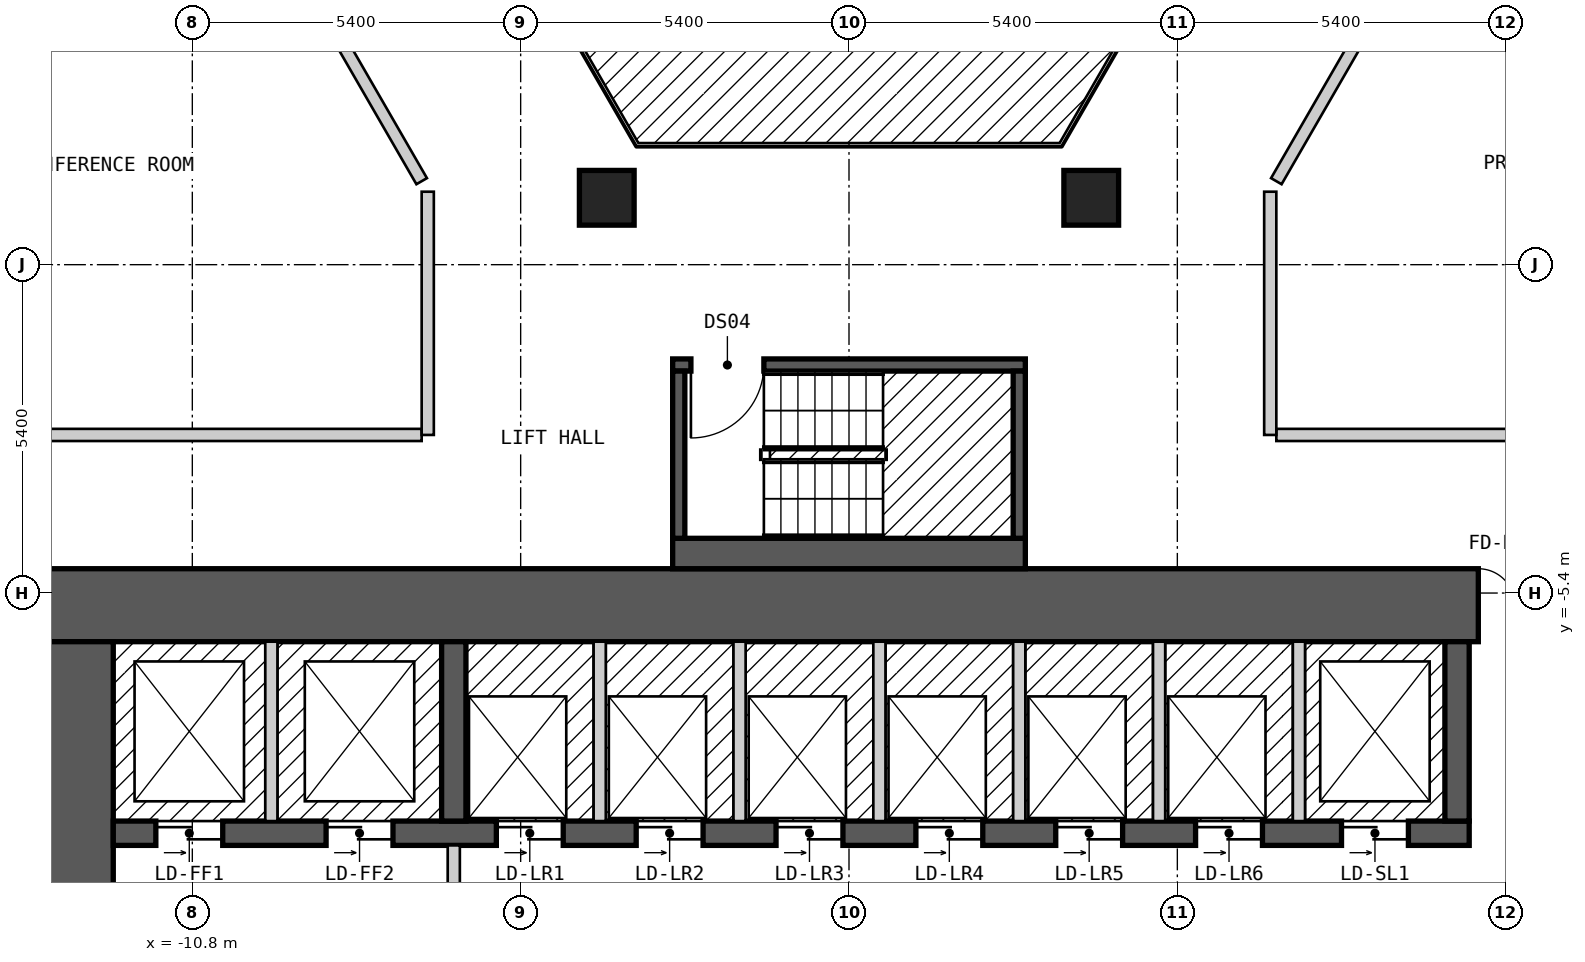
"""IFC4 building model, lengths in metres.
Left out: names, types, materials, properties, quantities, classifications, styles, units other than length and angle.
Written with IfcOpenShell. Run it as: python <this file> out.ifc"""

import sys

from ifc_helpers import new_model, si_unit, direction, frame, frame_2d, origin, origin_2d, place, context, subcontext, project, spatial, rectangle, extrude, element, fill, save


model = new_model("IFC4")
c1 = context("Model", 3, precision=1e-05, world=origin(), true_north=direction((0.0, 1.0)))
c2 = subcontext(c1, "Body", "Model", "MODEL_VIEW")
j1 = project(units=[si_unit("LENGTHUNIT", "METRE"), si_unit("PLANEANGLEUNIT", "RADIAN")], contexts=[c1])
p1 = place(None, origin())
s1 = spatial("IfcSite", under=j1, at=p1, CompositionType="ELEMENT")
p2 = place(p1, origin())
s2 = spatial("IfcBuilding", under=s1, at=p2, CompositionType="ELEMENT")
p3 = place(p2, frame((0.0, 0.0, 44.4)))
s3 = spatial("IfcBuildingStorey", under=s2, at=p3, CompositionType="ELEMENT", Elevation=44.4)
for number, where, z_axis, x_axis in (
    (1, (3.984, 1.1, 0.0), (0.0, 0.0, 1.0), (1.0, 0.0, 0.0)),
    (2, (-3.984, 1.1, 0.0), (0.0, 0.0, 1.0), (1.0, 0.0, 0.0)),
):
    element("IfcColumn", number, at=place(p3, frame(where, z_axis=z_axis, x_axis=x_axis)), inside=s3, PredefinedType="COLUMN", context=c2, shape_type="SweptSolid", body=[
        extrude(rectangle(XDim=0.9, YDim=0.9, at=origin_2d()), origin(), (0.0, 0.0, 1.0), 3.0),
    ])
p4 = place(p3, frame((-13.3, -5.6, 0.0), z_axis=(0.0, 0.0, 1.0), x_axis=(1.0, 0.0, 0.0)))
e3 = element("IfcWall", 3, at=p4, inside=s3, PredefinedType="SHEAR", context=c2, shape_type="SweptSolid", body=[
    extrude(rectangle(XDim=26.6, YDim=1.2, at=frame_2d((13.3, 0.0))), origin(), (0.0, 0.0, 1.0), 2.7),
])
p5 = place(p4, frame((23.65, 0.0, 0.0)))
e4 = element("IfcOpeningElement", 4, at=p5, cuts=e3, PredefinedType="OPENING", context=c2, shape_type="SweptSolid", body=[
    extrude(rectangle(XDim=1.2, YDim=2.1, at=frame_2d((0.6, 1.05))), frame((0.0, 0.61, 0.0), z_axis=(0.0, -1.0, 0.0), x_axis=(1.0, 0.0, 0.0)), (0.0, 0.0, 1.0), 1.22),
])
p6 = place(p3, frame((-12.7, -17.8, 0.0), z_axis=(0.0, 0.0, 1.0), x_axis=(0.0, 1.0, 0.0)))
e5 = element("IfcWall", 5, at=p6, inside=s3, PredefinedType="SHEAR", context=c2, shape_type="SweptSolid", body=[
    extrude(rectangle(XDim=11.6, YDim=1.2, at=frame_2d((5.8, 0.0))), origin(), (0.0, 0.0, 1.0), 2.7),
])
p7 = place(p6, frame((3.6, 0.0, 0.0)))
e6 = element("IfcOpeningElement", 6, at=p7, cuts=e5, PredefinedType="OPENING", context=c2, shape_type="SweptSolid", body=[
    extrude(rectangle(XDim=1.2, YDim=2.1, at=frame_2d((0.6, 1.05))), frame((0.0, 0.61, 0.0), z_axis=(0.0, -1.0, 0.0), x_axis=(1.0, 0.0, 0.0)), (0.0, 0.0, 1.0), 1.22),
])
p8 = place(p3, frame((-12.1, -9.35, 0.0), z_axis=(0.0, 0.0, 1.0), x_axis=(1.0, 0.0, 0.0)))
e7 = element("IfcWall", 7, at=p8, inside=s3, PredefinedType="SHEAR", context=c2, shape_type="SweptSolid", body=[
    extrude(rectangle(XDim=22.3, YDim=0.4, at=frame_2d((11.15, 0.0))), origin(), (0.0, 0.0, 1.0), 2.7),
])
p9 = place(p8, frame((0.7, 0.0, 0.0)))
e8 = element("IfcOpeningElement", 8, at=p9, cuts=e7, PredefinedType="OPENING", context=c2, shape_type="SweptSolid", body=[
    extrude(rectangle(XDim=1.1, YDim=2.1, at=frame_2d((0.55, 1.05))), frame((0.0, 0.21, 0.0), z_axis=(0.0, -1.0, 0.0), x_axis=(1.0, 0.0, 0.0)), (0.0, 0.0, 1.0), 0.42),
])
p10 = place(p8, frame((3.5, 0.0, 0.0)))
e9 = element("IfcOpeningElement", 9, at=p10, cuts=e7, PredefinedType="OPENING", context=c2, shape_type="SweptSolid", body=[
    extrude(rectangle(XDim=1.1, YDim=2.1, at=frame_2d((0.55, 1.05))), frame((0.0, 0.21, 0.0), z_axis=(0.0, -1.0, 0.0), x_axis=(1.0, 0.0, 0.0)), (0.0, 0.0, 1.0), 0.42),
])
p11 = place(p8, frame((6.3, 0.0, 0.0)))
e10 = element("IfcOpeningElement", 10, at=p11, cuts=e7, PredefinedType="OPENING", context=c2, shape_type="SweptSolid", body=[
    extrude(rectangle(XDim=1.1, YDim=2.1, at=frame_2d((0.55, 1.05))), frame((0.0, 0.21, 0.0), z_axis=(0.0, -1.0, 0.0), x_axis=(1.0, 0.0, 0.0)), (0.0, 0.0, 1.0), 0.42),
])
p12 = place(p8, frame((8.6, 0.0, 0.0)))
e11 = element("IfcOpeningElement", 11, at=p12, cuts=e7, PredefinedType="OPENING", context=c2, shape_type="SweptSolid", body=[
    extrude(rectangle(XDim=1.1, YDim=2.1, at=frame_2d((0.55, 1.05))), frame((0.0, 0.21, 0.0), z_axis=(0.0, -1.0, 0.0), x_axis=(1.0, 0.0, 0.0)), (0.0, 0.0, 1.0), 0.42),
])
p13 = place(p8, frame((10.9, 0.0, 0.0)))
e12 = element("IfcOpeningElement", 12, at=p13, cuts=e7, PredefinedType="OPENING", context=c2, shape_type="SweptSolid", body=[
    extrude(rectangle(XDim=1.1, YDim=2.1, at=frame_2d((0.55, 1.05))), frame((0.0, 0.21, 0.0), z_axis=(0.0, -1.0, 0.0), x_axis=(1.0, 0.0, 0.0)), (0.0, 0.0, 1.0), 0.42),
])
p14 = place(p8, frame((13.2, 0.0, 0.0)))
e13 = element("IfcOpeningElement", 13, at=p14, cuts=e7, PredefinedType="OPENING", context=c2, shape_type="SweptSolid", body=[
    extrude(rectangle(XDim=1.1, YDim=2.1, at=frame_2d((0.55, 1.05))), frame((0.0, 0.21, 0.0), z_axis=(0.0, -1.0, 0.0), x_axis=(1.0, 0.0, 0.0)), (0.0, 0.0, 1.0), 0.42),
])
p15 = place(p8, frame((15.5, 0.0, 0.0)))
e14 = element("IfcOpeningElement", 14, at=p15, cuts=e7, PredefinedType="OPENING", context=c2, shape_type="SweptSolid", body=[
    extrude(rectangle(XDim=1.1, YDim=2.1, at=frame_2d((0.55, 1.05))), frame((0.0, 0.21, 0.0), z_axis=(0.0, -1.0, 0.0), x_axis=(1.0, 0.0, 0.0)), (0.0, 0.0, 1.0), 0.42),
])
p16 = place(p8, frame((17.8, 0.0, 0.0)))
e15 = element("IfcOpeningElement", 15, at=p16, cuts=e7, PredefinedType="OPENING", context=c2, shape_type="SweptSolid", body=[
    extrude(rectangle(XDim=1.1, YDim=2.1, at=frame_2d((0.55, 1.05))), frame((0.0, 0.21, 0.0), z_axis=(0.0, -1.0, 0.0), x_axis=(1.0, 0.0, 0.0)), (0.0, 0.0, 1.0), 0.42),
])
p17 = place(p8, frame((20.2, 0.0, 0.0)))
e16 = element("IfcOpeningElement", 16, at=p17, cuts=e7, PredefinedType="OPENING", context=c2, shape_type="SweptSolid", body=[
    extrude(rectangle(XDim=1.1, YDim=2.1, at=frame_2d((0.55, 1.05))), frame((0.0, 0.21, 0.0), z_axis=(0.0, -1.0, 0.0), x_axis=(1.0, 0.0, 0.0)), (0.0, 0.0, 1.0), 0.42),
])
for number, where, z_axis, x_axis in (
    (17, (-6.5, -9.15, 0.0), (0.0, 0.0, 1.0), (0.0, 1.0, 0.0)),
    (18, (10.0, -9.15, 0.0), (0.0, 0.0, 1.0), (0.0, 1.0, 0.0)),
):
    element("IfcWall", number, at=place(p3, frame(where, z_axis=z_axis, x_axis=x_axis)), inside=s3, PredefinedType="SHEAR", context=c2, shape_type="SweptSolid", body=[
        extrude(rectangle(XDim=2.95, YDim=0.4, at=frame_2d((1.475, 0.0))), origin(), (0.0, 0.0, 1.0), 2.7),
    ])
p18 = place(p3, frame((-2.9, -4.75, 0.0), z_axis=(0.0, 0.0, 1.0), x_axis=(1.0, 0.0, 0.0)))
e19 = element("IfcWall", 19, at=p18, inside=s3, PredefinedType="SOLIDWALL", context=c2, shape_type="SweptSolid", body=[
    extrude(rectangle(XDim=5.8, YDim=0.5, at=frame_2d((2.9, 0.0))), origin(), (0.0, 0.0, 1.0), 2.7),
])
p19 = place(p3, frame((-2.9, -1.65, 0.0), z_axis=(0.0, 0.0, 1.0), x_axis=(1.0, 0.0, 0.0)))
e20 = element("IfcWall", 20, at=p19, inside=s3, PredefinedType="SOLIDWALL", context=c2, shape_type="SweptSolid", body=[
    extrude(rectangle(XDim=5.8, YDim=0.2, at=frame_2d((2.9, 0.0))), origin(), (0.0, 0.0, 1.0), 2.7),
])
p20 = place(p19, frame((0.3, 0.0, 0.0)))
e21 = element("IfcOpeningElement", 21, at=p20, cuts=e20, PredefinedType="OPENING", context=c2, shape_type="SweptSolid", body=[
    extrude(rectangle(XDim=1.2, YDim=2.1, at=frame_2d((0.6, 1.05))), frame((0.0, 0.11, 0.0), z_axis=(0.0, -1.0, 0.0), x_axis=(1.0, 0.0, 0.0)), (0.0, 0.0, 1.0), 0.22),
])
for number, where, z_axis, x_axis in (
    (22, (-2.8, -4.5, 0.0), (0.0, 0.0, 1.0), (0.0, 1.0, 0.0)),
    (23, (2.8, -4.5, 0.0), (0.0, 0.0, 1.0), (0.0, 1.0, 0.0)),
):
    element("IfcWall", number, at=place(p3, frame(where, z_axis=z_axis, x_axis=x_axis)), inside=s3, PredefinedType="SOLIDWALL", context=c2, shape_type="SweptSolid", body=[
        extrude(rectangle(XDim=2.75, YDim=0.2, at=frame_2d((1.375, 0.0))), origin(), (0.0, 0.0, 1.0), 2.7),
    ])
p21 = place(p3, frame((-10.796, 7.9, 0.0), z_axis=(0.0, 0.0, 1.0), x_axis=(0.499954271211, -0.866051803703, 0.0)))
e24 = element("IfcWall", 24, at=p21, inside=s3, PredefinedType="PARTITIONING", context=c2, shape_type="SweptSolid", body=[
    extrude(rectangle(XDim=7.536, YDim=0.2, at=frame_2d((3.768, 0.0))), origin(), (0.0, 0.0, 1.0), 2.7),
])
p22 = place(p3, frame((9.18, 15.7, 0.0), z_axis=(0.0, 0.0, 1.0), x_axis=(0.500003652032, -0.866023295272, 0.0)))
e25 = element("IfcWall", 25, at=p22, inside=s3, PredefinedType="PARTITIONING", context=c2, shape_type="SweptSolid", body=[
    extrude(rectangle(XDim=18.012, YDim=0.2, at=frame_2d((9.006, 0.0))), origin(), (0.0, 0.0, 1.0), 2.7),
])
p23 = place(p22, frame((8.556, 0.0, 0.0)))
e26 = element("IfcOpeningElement", 26, at=p23, cuts=e25, PredefinedType="OPENING", context=c2, shape_type="SweptSolid", body=[
    extrude(rectangle(XDim=0.9, YDim=2.1, at=frame_2d((0.45, 1.05))), frame((0.0, 0.11, 0.0), z_axis=(0.0, -1.0, 0.0), x_axis=(1.0, 0.0, 0.0)), (0.0, 0.0, 1.0), 0.22),
])
p24 = place(p3, frame((10.45, 17.9, 0.0), z_axis=(0.0, 0.0, 1.0), x_axis=(0.500034352617, -0.866005569383, 0.0)))
e27 = element("IfcWall", 27, at=p24, inside=s3, PredefinedType="PARTITIONING", context=c2, shape_type="SweptSolid", body=[
    extrude(rectangle(XDim=20.553, YDim=0.2, at=frame_2d((10.276, 0.0))), origin(), (0.0, 0.0, 1.0), 2.7),
])
p25 = place(p24, frame((14.902, 0.0, 0.0)))
e28 = element("IfcOpeningElement", 28, at=p25, cuts=e27, PredefinedType="OPENING", context=c2, shape_type="SweptSolid", body=[
    extrude(rectangle(XDim=1.0, YDim=2.1, at=frame_2d((0.5, 1.05))), frame((0.0, 0.11, 0.0), z_axis=(0.0, -1.0, 0.0), x_axis=(1.0, 0.0, 0.0)), (0.0, 0.0, 1.0), 0.22),
])
p26 = place(p24, frame((4.671, 0.0, 0.0)))
e29 = element("IfcOpeningElement", 29, at=p26, cuts=e27, PredefinedType="OPENING", context=c2, shape_type="SweptSolid", body=[
    extrude(rectangle(XDim=1.0, YDim=2.1, at=frame_2d((0.5, 1.05))), frame((0.0, 0.11, 0.0), z_axis=(0.0, -1.0, 0.0), x_axis=(1.0, 0.0, 0.0)), (0.0, 0.0, 1.0), 0.22),
])
for number, where, z_axis, x_axis in (
    (30, (-15.4, -2.8, 0.0), (0.0, 0.0, 1.0), (1.0, 0.0, 0.0)),
    (31, (7.028, -2.8, 0.0), (0.0, 0.0, 1.0), (1.0, 0.0, 0.0)),
):
    element("IfcWall", number, at=place(p3, frame(where, z_axis=z_axis, x_axis=x_axis)), inside=s3, PredefinedType="PARTITIONING", context=c2, shape_type="SweptSolid", body=[
        extrude(rectangle(XDim=8.372, YDim=0.2, at=frame_2d((4.186, 0.0))), origin(), (0.0, 0.0, 1.0), 2.7),
    ])
p27 = place(p3, frame((7.028, 1.373, 0.0), z_axis=(0.0, 0.0, 1.0), x_axis=(0.49998574534, 0.86603363356, 0.0)))
e32 = element("IfcWall", 32, at=p27, inside=s3, PredefinedType="PARTITIONING", context=c2, shape_type="SweptSolid", body=[
    extrude(rectangle(XDim=7.652, YDim=0.2, at=frame_2d((3.826, 0.0))), origin(), (0.0, 0.0, 1.0), 2.7),
])
p28 = place(p3, frame((-18.244, -0.001, 0.0), z_axis=(0.0, 0.0, 1.0), x_axis=(0.499962999376, 0.866046765051, 0.0)))
e33 = element("IfcWall", 33, at=p28, inside=s3, PredefinedType="PARTITIONING", context=c2, shape_type="SweptSolid", body=[
    extrude(rectangle(XDim=18.245, YDim=0.2, at=frame_2d((9.123, 0.0))), origin(), (0.0, 0.0, 1.0), 2.7),
])
p29 = place(p28, frame((8.672, 0.0, 0.0)))
e34 = element("IfcOpeningElement", 34, at=p29, cuts=e33, PredefinedType="OPENING", context=c2, shape_type="SweptSolid", body=[
    extrude(rectangle(XDim=0.9, YDim=2.1, at=frame_2d((0.45, 1.05))), frame((0.0, 0.11, 0.0), z_axis=(0.0, -1.0, 0.0), x_axis=(1.0, 0.0, 0.0)), (0.0, 0.0, 1.0), 0.22),
])
p30 = place(p3, frame((-20.727, 0.099, 0.0), z_axis=(0.0, 0.0, 1.0), x_axis=(0.499993204491, 0.866029327138, 0.0)))
e35 = element("IfcWall", 35, at=p30, inside=s3, PredefinedType="PARTITIONING", context=c2, shape_type="SweptSolid", body=[
    extrude(rectangle(XDim=20.554, YDim=0.2, at=frame_2d((10.277, 0.0))), origin(), (0.0, 0.0, 1.0), 2.7),
])
p31 = place(p30, frame((9.776, 0.0, 0.0)))
e36 = element("IfcOpeningElement", 36, at=p31, cuts=e35, PredefinedType="OPENING", context=c2, shape_type="SweptSolid", body=[
    extrude(rectangle(XDim=1.0, YDim=2.1, at=frame_2d((0.5, 1.05))), frame((0.0, 0.11, 0.0), z_axis=(0.0, -1.0, 0.0), x_axis=(1.0, 0.0, 0.0)), (0.0, 0.0, 1.0), 0.22),
])
p32 = place(p30, frame((4.673, 0.0, 0.0)))
e37 = element("IfcOpeningElement", 37, at=p32, cuts=e35, PredefinedType="OPENING", context=c2, shape_type="SweptSolid", body=[
    extrude(rectangle(XDim=1.0, YDim=2.1, at=frame_2d((0.5, 1.05))), frame((0.0, 0.11, 0.0), z_axis=(0.0, -1.0, 0.0), x_axis=(1.0, 0.0, 0.0)), (0.0, 0.0, 1.0), 0.22),
])
p33 = place(p30, frame((14.88, 0.0, 0.0)))
e38 = element("IfcOpeningElement", 38, at=p33, cuts=e35, PredefinedType="OPENING", context=c2, shape_type="SweptSolid", body=[
    extrude(rectangle(XDim=1.0, YDim=2.1, at=frame_2d((0.5, 1.05))), frame((0.0, 0.11, 0.0), z_axis=(0.0, -1.0, 0.0), x_axis=(1.0, 0.0, 0.0)), (0.0, 0.0, 1.0), 0.22),
])
for number, where, z_axis, x_axis in (
    (39, (6.928, -2.8, 0.0), (0.0, 0.0, 1.0), (0.0, 1.0, 0.0)),
    (40, (-6.928, -2.8, 0.0), (0.0, 0.0, 1.0), (0.0, 1.0, 0.0)),
):
    element("IfcWall", number, at=place(p3, frame(where, z_axis=z_axis, x_axis=x_axis)), inside=s3, PredefinedType="PARTITIONING", context=c2, shape_type="SweptSolid", body=[
        extrude(rectangle(XDim=4.0, YDim=0.2, at=frame_2d((2.0, 0.0))), origin(), (0.0, 0.0, 1.0), 2.7),
    ])
p34 = place(p3, frame((-9.5, -9.15, 0.0), z_axis=(0.0, 0.0, 1.0), x_axis=(0.0, 1.0, 0.0)))
e41 = element("IfcWall", 41, at=p34, inside=s3, PredefinedType="SOLIDWALL", context=c2, shape_type="SweptSolid", body=[
    extrude(rectangle(XDim=2.95, YDim=0.2, at=frame_2d((1.475, 0.0))), origin(), (0.0, 0.0, 1.0), 2.7),
])
p35 = place(p3, frame((-6.5, -14.45, 0.0), z_axis=(0.0, 0.0, 1.0), x_axis=(0.0, 1.0, 0.0)))
e42 = element("IfcWall", 42, at=p35, inside=s3, PredefinedType="PARTITIONING", context=c2, shape_type="SweptSolid", body=[
    extrude(rectangle(XDim=4.9, YDim=0.2, at=frame_2d((2.45, 0.0))), origin(), (0.0, 0.0, 1.0), 2.7),
])
p36 = place(p35, frame((3.15, 0.0, 0.0), z_axis=(0.0, 0.0, 1.0), x_axis=(-1.0, 0.0, 0.0)))
e43 = element("IfcOpeningElement", 43, at=p36, cuts=e42, PredefinedType="OPENING", context=c2, shape_type="SweptSolid", body=[
    extrude(rectangle(XDim=1.4, YDim=2.1, at=frame_2d((0.7, 1.05))), frame((0.0, 0.11, 0.0), z_axis=(0.0, -1.0, 0.0), x_axis=(1.0, 0.0, 0.0)), (0.0, 0.0, 1.0), 0.22),
])
for number, where, z_axis, x_axis in (
    (44, (-4.1, -9.15, 0.0), (0.0, 0.0, 1.0), (0.0, 1.0, 0.0)),
    (45, (-1.8, -9.15, 0.0), (0.0, 0.0, 1.0), (0.0, 1.0, 0.0)),
    (46, (0.5, -9.15, 0.0), (0.0, 0.0, 1.0), (0.0, 1.0, 0.0)),
    (47, (2.8, -9.15, 0.0), (0.0, 0.0, 1.0), (0.0, 1.0, 0.0)),
    (48, (5.1, -9.15, 0.0), (0.0, 0.0, 1.0), (0.0, 1.0, 0.0)),
    (49, (7.4, -9.15, 0.0), (0.0, 0.0, 1.0), (0.0, 1.0, 0.0)),
):
    element("IfcWall", number, at=place(p3, frame(where, z_axis=z_axis, x_axis=x_axis)), inside=s3, PredefinedType="SOLIDWALL", context=c2, shape_type="SweptSolid", body=[
        extrude(rectangle(XDim=2.95, YDim=0.2, at=frame_2d((1.475, 0.0))), origin(), (0.0, 0.0, 1.0), 2.7),
    ])
p37 = place(p20, origin())
e50 = element("IfcDoor", 50, at=p37, inside=s3, OperationType="SINGLE_SWING_LEFT", PredefinedType="DOOR", context=c2, shape_type="SweptSolid", body=[
    extrude(rectangle(XDim=1.2, YDim=2.1, at=frame_2d((0.6, 1.05))), frame((0.0, 0.025, 0.0), z_axis=(0.0, -1.0, 0.0), x_axis=(1.0, 0.0, 0.0)), (0.0, 0.0, 1.0), 0.05),
])
fill(e21, e50)
p38 = place(p9, origin())
e51 = element("IfcDoor", 51, at=p38, inside=s3, OperationType="DOUBLE_DOOR_SLIDING", PredefinedType="DOOR", context=c2, shape_type="SweptSolid", body=[
    extrude(rectangle(XDim=1.1, YDim=2.1, at=frame_2d((0.55, 1.05))), frame((0.0, 0.025, 0.0), z_axis=(0.0, -1.0, 0.0), x_axis=(1.0, 0.0, 0.0)), (0.0, 0.0, 1.0), 0.05),
])
fill(e8, e51)
p39 = place(p10, origin())
e52 = element("IfcDoor", 52, at=p39, inside=s3, OperationType="DOUBLE_DOOR_SLIDING", PredefinedType="DOOR", context=c2, shape_type="SweptSolid", body=[
    extrude(rectangle(XDim=1.1, YDim=2.1, at=frame_2d((0.55, 1.05))), frame((0.0, 0.025, 0.0), z_axis=(0.0, -1.0, 0.0), x_axis=(1.0, 0.0, 0.0)), (0.0, 0.0, 1.0), 0.05),
])
fill(e9, e52)
p40 = place(p11, origin())
e53 = element("IfcDoor", 53, at=p40, inside=s3, OperationType="DOUBLE_DOOR_SLIDING", PredefinedType="DOOR", context=c2, shape_type="SweptSolid", body=[
    extrude(rectangle(XDim=1.1, YDim=2.1, at=frame_2d((0.55, 1.05))), frame((0.0, 0.025, 0.0), z_axis=(0.0, -1.0, 0.0), x_axis=(1.0, 0.0, 0.0)), (0.0, 0.0, 1.0), 0.05),
])
fill(e10, e53)
p41 = place(p12, origin())
e54 = element("IfcDoor", 54, at=p41, inside=s3, OperationType="DOUBLE_DOOR_SLIDING", PredefinedType="DOOR", context=c2, shape_type="SweptSolid", body=[
    extrude(rectangle(XDim=1.1, YDim=2.1, at=frame_2d((0.55, 1.05))), frame((0.0, 0.025, 0.0), z_axis=(0.0, -1.0, 0.0), x_axis=(1.0, 0.0, 0.0)), (0.0, 0.0, 1.0), 0.05),
])
fill(e11, e54)
p42 = place(p13, origin())
e55 = element("IfcDoor", 55, at=p42, inside=s3, OperationType="DOUBLE_DOOR_SLIDING", PredefinedType="DOOR", context=c2, shape_type="SweptSolid", body=[
    extrude(rectangle(XDim=1.1, YDim=2.1, at=frame_2d((0.55, 1.05))), frame((0.0, 0.025, 0.0), z_axis=(0.0, -1.0, 0.0), x_axis=(1.0, 0.0, 0.0)), (0.0, 0.0, 1.0), 0.05),
])
fill(e12, e55)
p43 = place(p14, origin())
e56 = element("IfcDoor", 56, at=p43, inside=s3, OperationType="DOUBLE_DOOR_SLIDING", PredefinedType="DOOR", context=c2, shape_type="SweptSolid", body=[
    extrude(rectangle(XDim=1.1, YDim=2.1, at=frame_2d((0.55, 1.05))), frame((0.0, 0.025, 0.0), z_axis=(0.0, -1.0, 0.0), x_axis=(1.0, 0.0, 0.0)), (0.0, 0.0, 1.0), 0.05),
])
fill(e13, e56)
p44 = place(p15, origin())
e57 = element("IfcDoor", 57, at=p44, inside=s3, OperationType="DOUBLE_DOOR_SLIDING", PredefinedType="DOOR", context=c2, shape_type="SweptSolid", body=[
    extrude(rectangle(XDim=1.1, YDim=2.1, at=frame_2d((0.55, 1.05))), frame((0.0, 0.025, 0.0), z_axis=(0.0, -1.0, 0.0), x_axis=(1.0, 0.0, 0.0)), (0.0, 0.0, 1.0), 0.05),
])
fill(e14, e57)
p45 = place(p16, origin())
e58 = element("IfcDoor", 58, at=p45, inside=s3, OperationType="DOUBLE_DOOR_SLIDING", PredefinedType="DOOR", context=c2, shape_type="SweptSolid", body=[
    extrude(rectangle(XDim=1.1, YDim=2.1, at=frame_2d((0.55, 1.05))), frame((0.0, 0.025, 0.0), z_axis=(0.0, -1.0, 0.0), x_axis=(1.0, 0.0, 0.0)), (0.0, 0.0, 1.0), 0.05),
])
fill(e15, e58)
p46 = place(p17, origin())
e59 = element("IfcDoor", 59, at=p46, inside=s3, OperationType="DOUBLE_DOOR_SLIDING", PredefinedType="DOOR", context=c2, shape_type="SweptSolid", body=[
    extrude(rectangle(XDim=1.1, YDim=2.1, at=frame_2d((0.55, 1.05))), frame((0.0, 0.025, 0.0), z_axis=(0.0, -1.0, 0.0), x_axis=(1.0, 0.0, 0.0)), (0.0, 0.0, 1.0), 0.05),
])
fill(e16, e59)
p47 = place(p5, origin())
e60 = element("IfcDoor", 60, at=p47, inside=s3, OperationType="DOUBLE_DOOR_SINGLE_SWING", PredefinedType="DOOR", context=c2, shape_type="SweptSolid", body=[
    extrude(rectangle(XDim=1.2, YDim=2.1, at=frame_2d((0.6, 1.05))), frame((0.0, 0.025, 0.0), z_axis=(0.0, -1.0, 0.0), x_axis=(1.0, 0.0, 0.0)), (0.0, 0.0, 1.0), 0.05),
])
fill(e4, e60)
save(model, sys.argv[1])
